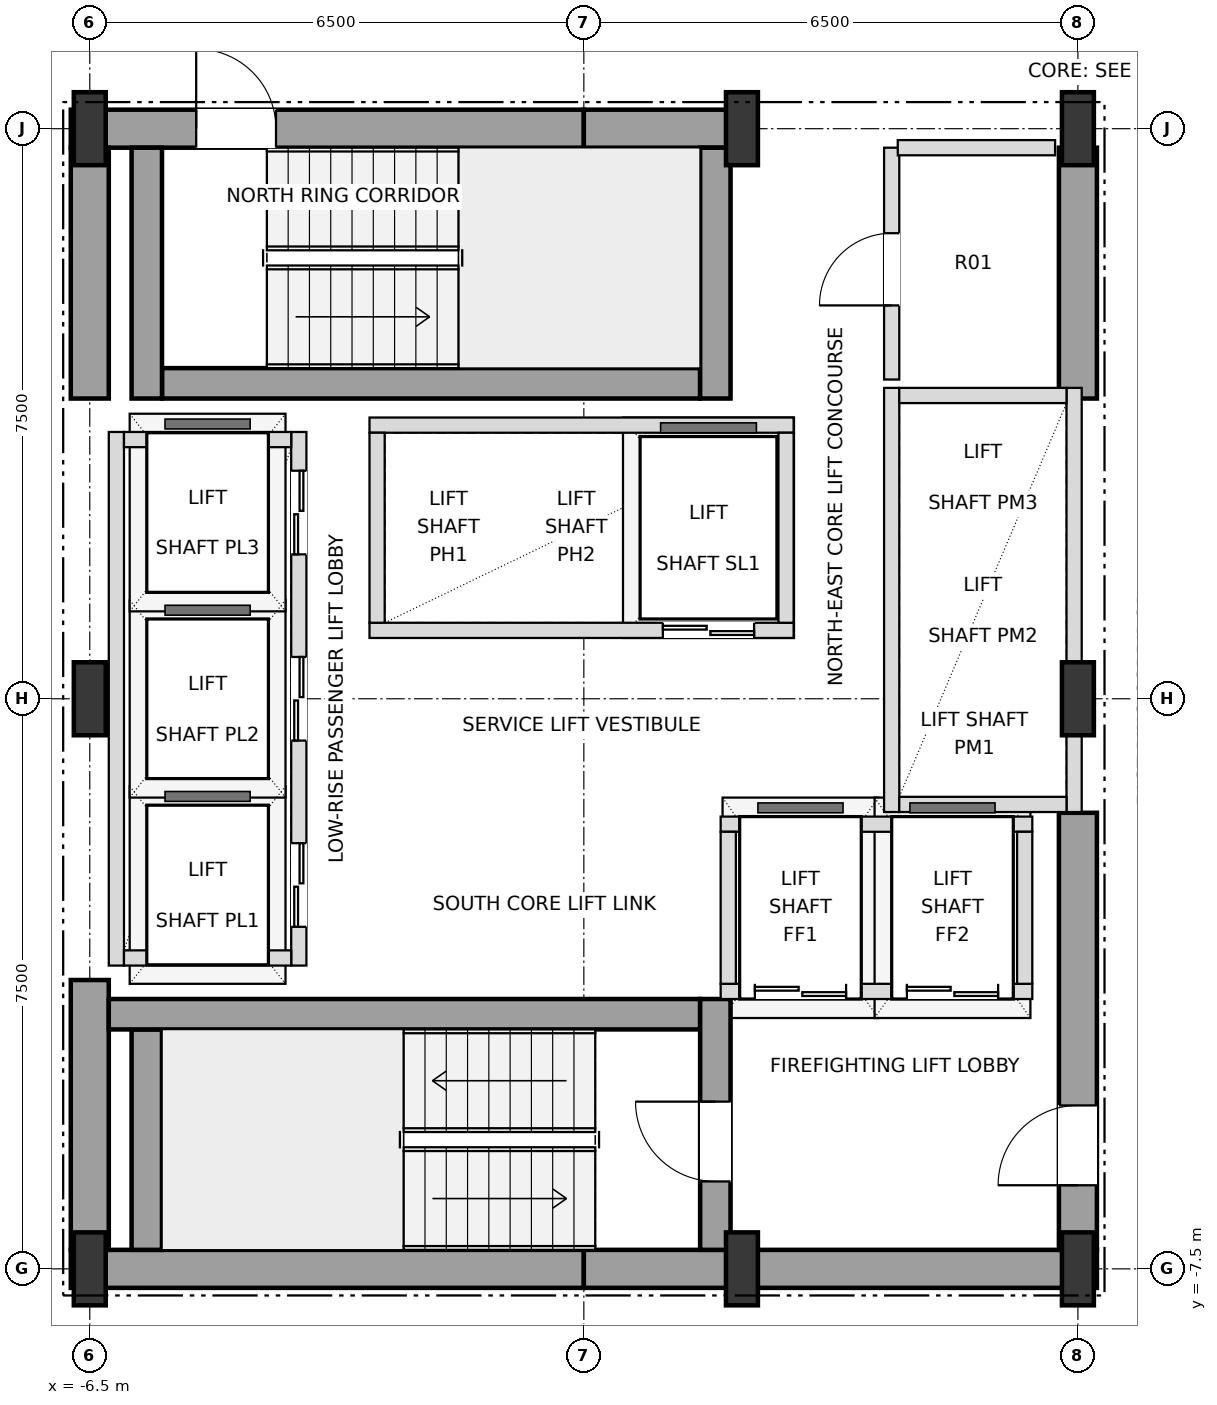
"""IFC4 building model, lengths in metres.
Left out: names, types, materials, properties, quantities, classifications, styles, units other than length and angle.
Written with IfcOpenShell. Run it as: python <this file> out.ifc"""

import sys

from ifc_helpers import new_model, si_unit, direction, frame, frame_2d, origin, origin_2d, place, context, subcontext, project, spatial, rectangle, i_section, extrude, element, fill, save


model = new_model("IFC4")
c1 = context("Model", 3, precision=1e-05, world=origin(), true_north=direction((0.0, 1.0)))
c2 = subcontext(c1, "Body", "Model", "MODEL_VIEW")
j1 = project(units=[si_unit("LENGTHUNIT", "METRE"), si_unit("PLANEANGLEUNIT", "RADIAN")], contexts=[c1])
p1 = place(None, origin())
s1 = spatial("IfcSite", under=j1, at=p1, CompositionType="ELEMENT")
p2 = place(p1, origin())
s2 = spatial("IfcBuilding", under=s1, at=p2, CompositionType="ELEMENT")
p3 = place(p2, frame((0.0, 0.0, 113.4)))
s3 = spatial("IfcBuildingStorey", under=s2, at=p3, CompositionType="ELEMENT", Elevation=113.4)
for number, where, z_axis, x_axis in (
    (1, (-6.5, -7.5, 0.0), (0.0, 0.0, 1.0), (1.0, 0.0, 0.0)),
    (2, (2.08, -7.5, 0.0), (0.0, 0.0, 1.0), (1.0, 0.0, 0.0)),
    (3, (6.5, -7.5, 0.0), (0.0, 0.0, 1.0), (1.0, 0.0, 0.0)),
    (4, (-6.5, 0.0, 0.0), (0.0, 0.0, 1.0), (1.0, 0.0, 0.0)),
    (5, (6.5, 0.0, 0.0), (0.0, 0.0, 1.0), (1.0, 0.0, 0.0)),
    (6, (-6.5, 7.5, 0.0), (0.0, 0.0, 1.0), (1.0, 0.0, 0.0)),
    (7, (2.08, 7.5, 0.0), (0.0, 0.0, 1.0), (1.0, 0.0, 0.0)),
    (8, (6.5, 7.5, 0.0), (0.0, 0.0, 1.0), (1.0, 0.0, 0.0)),
):
    element("IfcColumn", number, at=place(p3, frame(where, z_axis=z_axis, x_axis=x_axis)), inside=s3, PredefinedType="COLUMN", context=c2, shape_type="SweptSolid", body=[
        extrude(i_section(OverallWidth=0.42, OverallDepth=0.96, WebThickness=0.022, FlangeThickness=0.034, at=origin_2d()), origin(), (0.0, 0.0, 1.0), 3.6),
    ])
for number, where, z_axis, x_axis in (
    (9, (-6.75, -7.5, 0.0), (0.0, 0.0, 1.0), (1.0, 0.0, 0.0)),
    (10, (0.0, -7.5, 0.0), (0.0, 0.0, 1.0), (1.0, 0.0, 0.0)),
):
    element("IfcWall", number, at=place(p3, frame(where, z_axis=z_axis, x_axis=x_axis)), inside=s3, PredefinedType="SHEAR", context=c2, shape_type="SweptSolid", body=[
        extrude(rectangle(XDim=6.75, YDim=0.5, at=frame_2d((3.375, 0.0))), origin(), (0.0, 0.0, 1.0), 3.38),
    ])
p4 = place(p3, frame((-6.75, 7.5, 0.0), z_axis=(0.0, 0.0, 1.0), x_axis=(1.0, 0.0, 0.0)))
e11 = element("IfcWall", 11, at=p4, inside=s3, PredefinedType="SHEAR", context=c2, shape_type="SweptSolid", body=[
    extrude(rectangle(XDim=6.75, YDim=0.5, at=frame_2d((3.375, 0.0))), origin(), (0.0, 0.0, 1.0), 3.38),
])
p5 = place(p4, frame((1.65, 0.0, 0.0)))
e12 = element("IfcOpeningElement", 12, at=p5, cuts=e11, PredefinedType="OPENING", context=c2, shape_type="SweptSolid", body=[
    extrude(rectangle(XDim=1.05, YDim=2.15, at=frame_2d((0.525, 1.075))), frame((0.0, 0.26, 0.0), z_axis=(0.0, -1.0, 0.0), x_axis=(1.0, 0.0, 0.0)), (0.0, 0.0, 1.0), 0.52),
])
p6 = place(p3, frame((0.0, 7.5, 0.0), z_axis=(0.0, 0.0, 1.0), x_axis=(1.0, 0.0, 0.0)))
e13 = element("IfcWall", 13, at=p6, inside=s3, PredefinedType="SHEAR", context=c2, shape_type="SweptSolid", body=[
    extrude(rectangle(XDim=2.08, YDim=0.5, at=frame_2d((1.04, 0.0))), origin(), (0.0, 0.0, 1.0), 3.38),
])
p7 = place(p3, frame((-6.5, -7.25, 0.0), z_axis=(0.0, 0.0, 1.0), x_axis=(0.0, 1.0, 0.0)))
e14 = element("IfcWall", 14, at=p7, inside=s3, PredefinedType="SHEAR", context=c2, shape_type="SweptSolid", body=[
    extrude(rectangle(XDim=3.55, YDim=0.5, at=frame_2d((1.775, 0.0))), origin(), (0.0, 0.0, 1.0), 3.38),
])
p8 = place(p3, frame((-6.5, 3.95, 0.0), z_axis=(0.0, 0.0, 1.0), x_axis=(0.0, 1.0, 0.0)))
e15 = element("IfcWall", 15, at=p8, inside=s3, PredefinedType="SHEAR", context=c2, shape_type="SweptSolid", body=[
    extrude(rectangle(XDim=3.3, YDim=0.5, at=frame_2d((1.65, 0.0))), origin(), (0.0, 0.0, 1.0), 3.38),
])
p9 = place(p3, frame((6.5, -7.25, 0.0), z_axis=(0.0, 0.0, 1.0), x_axis=(0.0, 1.0, 0.0)))
e16 = element("IfcWall", 16, at=p9, inside=s3, PredefinedType="SHEAR", context=c2, shape_type="SweptSolid", body=[
    extrude(rectangle(XDim=5.75, YDim=0.5, at=frame_2d((2.875, 0.0))), origin(), (0.0, 0.0, 1.0), 3.38),
])
p10 = place(p9, frame((0.85, 0.0, 0.0)))
e17 = element("IfcOpeningElement", 17, at=p10, cuts=e16, PredefinedType="OPENING", context=c2, shape_type="SweptSolid", body=[
    extrude(rectangle(XDim=1.05, YDim=2.15, at=frame_2d((0.525, 1.075))), frame((0.0, 0.26, 0.0), z_axis=(0.0, -1.0, 0.0), x_axis=(1.0, 0.0, 0.0)), (0.0, 0.0, 1.0), 0.52),
])
p11 = place(p3, frame((6.5, 3.95, 0.0), z_axis=(0.0, 0.0, 1.0), x_axis=(0.0, 1.0, 0.0)))
e18 = element("IfcWall", 18, at=p11, inside=s3, PredefinedType="SHEAR", context=c2, shape_type="SweptSolid", body=[
    extrude(rectangle(XDim=3.3, YDim=0.5, at=frame_2d((1.65, 0.0))), origin(), (0.0, 0.0, 1.0), 3.38),
])
p12 = place(p3, frame((-5.75, -7.25, 0.0), z_axis=(0.0, 0.0, 1.0), x_axis=(0.0, 1.0, 0.0)))
e19 = element("IfcWall", 19, at=p12, inside=s3, PredefinedType="SHEAR", context=c2, shape_type="SweptSolid", body=[
    extrude(rectangle(XDim=2.9, YDim=0.4, at=frame_2d((1.45, 0.0))), origin(), (0.0, 0.0, 1.0), 3.38),
])
p13 = place(p3, frame((-6.25, -4.15, 0.0), z_axis=(0.0, 0.0, 1.0), x_axis=(1.0, 0.0, 0.0)))
e20 = element("IfcWall", 20, at=p13, inside=s3, PredefinedType="SHEAR", context=c2, shape_type="SweptSolid", body=[
    extrude(rectangle(XDim=7.78, YDim=0.4, at=frame_2d((3.89, 0.0))), origin(), (0.0, 0.0, 1.0), 3.38),
])
p14 = place(p3, frame((1.73, -7.25, 0.0), z_axis=(0.0, 0.0, 1.0), x_axis=(0.0, 1.0, 0.0)))
e21 = element("IfcWall", 21, at=p14, inside=s3, PredefinedType="SHEAR", context=c2, shape_type="SweptSolid", body=[
    extrude(rectangle(XDim=3.3, YDim=0.4, at=frame_2d((1.65, 0.0))), origin(), (0.0, 0.0, 1.0), 3.38),
])
p15 = place(p14, frame((0.9, 0.0, 0.0)))
e22 = element("IfcOpeningElement", 22, at=p15, cuts=e21, PredefinedType="OPENING", context=c2, shape_type="SweptSolid", body=[
    extrude(rectangle(XDim=1.05, YDim=2.15, at=frame_2d((0.525, 1.075))), frame((0.0, 0.21, 0.0), z_axis=(0.0, -1.0, 0.0), x_axis=(1.0, 0.0, 0.0)), (0.0, 0.0, 1.0), 0.42),
])
p16 = place(p3, frame((-5.55, 4.15, 0.0), z_axis=(0.0, 0.0, 1.0), x_axis=(1.0, 0.0, 0.0)))
e23 = element("IfcWall", 23, at=p16, inside=s3, PredefinedType="SHEAR", context=c2, shape_type="SweptSolid", body=[
    extrude(rectangle(XDim=7.08, YDim=0.4, at=frame_2d((3.54, 0.0))), origin(), (0.0, 0.0, 1.0), 3.38),
])
for number, where, z_axis, x_axis in (
    (24, (1.73, 3.95, 0.0), (0.0, 0.0, 1.0), (0.0, 1.0, 0.0)),
    (25, (-5.75, 3.95, 0.0), (0.0, 0.0, 1.0), (0.0, 1.0, 0.0)),
):
    element("IfcWall", number, at=place(p3, frame(where, z_axis=z_axis, x_axis=x_axis)), inside=s3, PredefinedType="SHEAR", context=c2, shape_type="SweptSolid", body=[
        extrude(rectangle(XDim=3.3, YDim=0.4, at=frame_2d((1.65, 0.0))), origin(), (0.0, 0.0, 1.0), 3.38),
    ])
p17 = place(p3, frame((-3.75, -3.51, 0.0), z_axis=(0.0, 0.0, 1.0), x_axis=(0.0, 1.0, 0.0)))
e26 = element("IfcWall", 26, at=p17, inside=s3, PredefinedType="SOLIDWALL", context=c2, shape_type="SweptSolid", body=[
    extrude(rectangle(XDim=7.02, YDim=0.2, at=frame_2d((3.51, 0.0))), origin(), (0.0, 0.0, 1.0), 3.38),
])
p18 = place(p17, frame((0.51, 0.0, 0.0)))
e27 = element("IfcOpeningElement", 27, at=p18, cuts=e26, PredefinedType="OPENING", context=c2, shape_type="SweptSolid", body=[
    extrude(rectangle(XDim=1.1, YDim=2.15, at=frame_2d((0.55, 1.075))), frame((0.0, 0.11, 0.0), z_axis=(0.0, -1.0, 0.0), x_axis=(1.0, 0.0, 0.0)), (0.0, 0.0, 1.0), 0.22),
])
p19 = place(p17, frame((2.96, 0.0, 0.0)))
e28 = element("IfcOpeningElement", 28, at=p19, cuts=e26, PredefinedType="OPENING", context=c2, shape_type="SweptSolid", body=[
    extrude(rectangle(XDim=1.1, YDim=2.15, at=frame_2d((0.55, 1.075))), frame((0.0, 0.11, 0.0), z_axis=(0.0, -1.0, 0.0), x_axis=(1.0, 0.0, 0.0)), (0.0, 0.0, 1.0), 0.22),
])
p20 = place(p17, frame((5.41, 0.0, 0.0)))
e29 = element("IfcOpeningElement", 29, at=p20, cuts=e26, PredefinedType="OPENING", context=c2, shape_type="SweptSolid", body=[
    extrude(rectangle(XDim=1.1, YDim=2.15, at=frame_2d((0.55, 1.075))), frame((0.0, 0.11, 0.0), z_axis=(0.0, -1.0, 0.0), x_axis=(1.0, 0.0, 0.0)), (0.0, 0.0, 1.0), 0.22),
])
p21 = place(p3, frame((-6.15, -3.51, 0.0), z_axis=(0.0, 0.0, 1.0), x_axis=(0.0, 1.0, 0.0)))
e30 = element("IfcWall", 30, at=p21, inside=s3, PredefinedType="SOLIDWALL", context=c2, shape_type="SweptSolid", body=[
    extrude(rectangle(XDim=7.02, YDim=0.2, at=frame_2d((3.51, 0.0))), origin(), (0.0, 0.0, 1.0), 3.38),
])
for number, where, z_axis, x_axis in (
    (31, (-6.05, -3.41, 0.0), (0.0, 0.0, 1.0), (1.0, 0.0, 0.0)),
    (32, (-6.05, 3.41, 0.0), (0.0, 0.0, 1.0), (1.0, 0.0, 0.0)),
):
    element("IfcWall", number, at=place(p3, frame(where, z_axis=z_axis, x_axis=x_axis)), inside=s3, PredefinedType="SOLIDWALL", context=c2, shape_type="SweptSolid", body=[
        extrude(rectangle(XDim=2.2, YDim=0.2, at=frame_2d((1.1, 0.0))), origin(), (0.0, 0.0, 1.0), 3.38),
    ])
p22 = place(p3, frame((4.05, -1.49, 0.0), z_axis=(0.0, 0.0, 1.0), x_axis=(0.0, 1.0, 0.0)))
e33 = element("IfcWall", 33, at=p22, inside=s3, PredefinedType="SOLIDWALL", context=c2, shape_type="SweptSolid", body=[
    extrude(rectangle(XDim=5.58, YDim=0.2, at=frame_2d((2.79, 0.0))), origin(), (0.0, 0.0, 1.0), 3.38),
])
p23 = place(p3, frame((6.45, -1.49, 0.0), z_axis=(0.0, 0.0, 1.0), x_axis=(0.0, 1.0, 0.0)))
e34 = element("IfcWall", 34, at=p23, inside=s3, PredefinedType="SOLIDWALL", context=c2, shape_type="SweptSolid", body=[
    extrude(rectangle(XDim=5.58, YDim=0.2, at=frame_2d((2.79, 0.0))), origin(), (0.0, 0.0, 1.0), 2.816),
])
for number, where, z_axis, x_axis in (
    (35, (4.15, -1.39, 0.0), (0.0, 0.0, 1.0), (1.0, 0.0, 0.0)),
    (36, (4.15, 3.99, 0.0), (0.0, 0.0, 1.0), (1.0, 0.0, 0.0)),
):
    element("IfcWall", number, at=place(p3, frame(where, z_axis=z_axis, x_axis=x_axis)), inside=s3, PredefinedType="SOLIDWALL", context=c2, shape_type="SweptSolid", body=[
        extrude(rectangle(XDim=2.2, YDim=0.2, at=frame_2d((1.1, 0.0))), origin(), (0.0, 0.0, 1.0), 3.38),
    ])
p24 = place(p3, frame((-2.82, 0.9, 0.0), z_axis=(0.0, 0.0, 1.0), x_axis=(1.0, 0.0, 0.0)))
e37 = element("IfcWall", 37, at=p24, inside=s3, PredefinedType="SOLIDWALL", context=c2, shape_type="SweptSolid", body=[
    extrude(rectangle(XDim=5.58, YDim=0.2, at=frame_2d((2.79, 0.0))), origin(), (0.0, 0.0, 1.0), 3.38),
])
p25 = place(p24, frame((3.86, 0.0, 0.0)))
e38 = element("IfcOpeningElement", 38, at=p25, cuts=e37, PredefinedType="OPENING", context=c2, shape_type="SweptSolid", body=[
    extrude(rectangle(XDim=1.2, YDim=2.2, at=frame_2d((0.6, 1.1))), frame((0.0, 0.11, 0.0), z_axis=(0.0, -1.0, 0.0), x_axis=(1.0, 0.0, 0.0)), (0.0, 0.0, 1.0), 0.22),
])
p26 = place(p3, frame((-2.82, 3.6, 0.0), z_axis=(0.0, 0.0, 1.0), x_axis=(1.0, 0.0, 0.0)))
e39 = element("IfcWall", 39, at=p26, inside=s3, PredefinedType="SOLIDWALL", context=c2, shape_type="SweptSolid", body=[
    extrude(rectangle(XDim=5.58, YDim=0.2, at=frame_2d((2.79, 0.0))), origin(), (0.0, 0.0, 1.0), 3.38),
])
for number, where, z_axis, x_axis in (
    (40, (-2.72, 1.0, 0.0), (0.0, 0.0, 1.0), (0.0, 1.0, 0.0)),
    (41, (2.66, 1.0, 0.0), (0.0, 0.0, 1.0), (0.0, 1.0, 0.0)),
):
    element("IfcWall", number, at=place(p3, frame(where, z_axis=z_axis, x_axis=x_axis)), inside=s3, PredefinedType="SOLIDWALL", context=c2, shape_type="SweptSolid", body=[
        extrude(rectangle(XDim=2.5, YDim=0.2, at=frame_2d((1.25, 0.0))), origin(), (0.0, 0.0, 1.0), 3.38),
    ])
p27 = place(p3, frame((1.8, -3.85, 0.0), z_axis=(0.0, 0.0, 1.0), x_axis=(1.0, 0.0, 0.0)))
e42 = element("IfcWall", 42, at=p27, inside=s3, PredefinedType="SOLIDWALL", context=c2, shape_type="SweptSolid", body=[
    extrude(rectangle(XDim=4.1, YDim=0.2, at=frame_2d((2.05, 0.0))), origin(), (0.0, 0.0, 1.0), 3.38),
])
p28 = place(p27, frame((0.45, 0.0, 0.0)))
e43 = element("IfcOpeningElement", 43, at=p28, cuts=e42, PredefinedType="OPENING", context=c2, shape_type="SweptSolid", body=[
    extrude(rectangle(XDim=1.2, YDim=2.2, at=frame_2d((0.6, 1.1))), frame((0.0, 0.11, 0.0), z_axis=(0.0, -1.0, 0.0), x_axis=(1.0, 0.0, 0.0)), (0.0, 0.0, 1.0), 0.22),
])
p29 = place(p27, frame((2.45, 0.0, 0.0)))
e44 = element("IfcOpeningElement", 44, at=p29, cuts=e42, PredefinedType="OPENING", context=c2, shape_type="SweptSolid", body=[
    extrude(rectangle(XDim=1.2, YDim=2.2, at=frame_2d((0.6, 1.1))), frame((0.0, 0.11, 0.0), z_axis=(0.0, -1.0, 0.0), x_axis=(1.0, 0.0, 0.0)), (0.0, 0.0, 1.0), 0.22),
])
p30 = place(p3, frame((1.8, -1.65, 0.0), z_axis=(0.0, 0.0, 1.0), x_axis=(1.0, 0.0, 0.0)))
e45 = element("IfcWall", 45, at=p30, inside=s3, PredefinedType="SOLIDWALL", context=c2, shape_type="SweptSolid", body=[
    extrude(rectangle(XDim=4.1, YDim=0.2, at=frame_2d((2.05, 0.0))), origin(), (0.0, 0.0, 1.0), 3.38),
])
for number, where, z_axis, x_axis in (
    (46, (1.9, -3.75, 0.0), (0.0, 0.0, 1.0), (0.0, 1.0, 0.0)),
    (47, (5.8, -3.75, 0.0), (0.0, 0.0, 1.0), (0.0, 1.0, 0.0)),
):
    element("IfcWall", number, at=place(p3, frame(where, z_axis=z_axis, x_axis=x_axis)), inside=s3, PredefinedType="SOLIDWALL", context=c2, shape_type="SweptSolid", body=[
        extrude(rectangle(XDim=2.0, YDim=0.2, at=frame_2d((1.0, 0.0))), origin(), (0.0, 0.0, 1.0), 3.38),
    ])
p31 = place(p3, frame((4.05, 4.2, 0.0), z_axis=(0.0, 0.0, 1.0), x_axis=(0.0, 1.0, 0.0)))
e48 = element("IfcWall", 48, at=p31, inside=s3, PredefinedType="SOLIDWALL", context=c2, shape_type="SweptSolid", body=[
    extrude(rectangle(XDim=3.05, YDim=0.2, at=frame_2d((1.525, 0.0))), origin(), (0.0, 0.0, 1.0), 3.38),
])
p32 = place(p31, frame((0.975, 0.0, 0.0)))
e49 = element("IfcOpeningElement", 49, at=p32, cuts=e48, PredefinedType="OPENING", context=c2, shape_type="SweptSolid", body=[
    extrude(rectangle(XDim=0.95, YDim=2.15, at=frame_2d((0.475, 1.075))), frame((0.0, 0.11, 0.0), z_axis=(0.0, -1.0, 0.0), x_axis=(1.0, 0.0, 0.0)), (0.0, 0.0, 1.0), 0.22),
])
p33 = place(p3, frame((4.13, 7.25, 0.0), z_axis=(0.0, 0.0, 1.0), x_axis=(1.0, 0.0, 0.0)))
e50 = element("IfcWall", 50, at=p33, inside=s3, PredefinedType="SOLIDWALL", context=c2, shape_type="SweptSolid", body=[
    extrude(rectangle(XDim=2.07, YDim=0.2, at=frame_2d((1.035, 0.0))), origin(), (0.0, 0.0, 1.0), 3.38),
])
p34 = place(p10, origin())
e51 = element("IfcDoor", 51, at=p34, inside=s3, OperationType="SINGLE_SWING_LEFT", PredefinedType="DOOR", context=c2, shape_type="SweptSolid", body=[
    extrude(rectangle(XDim=1.05, YDim=2.15, at=frame_2d((0.525, 1.075))), frame((0.0, 0.025, 0.0), z_axis=(0.0, -1.0, 0.0), x_axis=(1.0, 0.0, 0.0)), (0.0, 0.0, 1.0), 0.05),
])
fill(e17, e51)
p35 = place(p15, origin())
e52 = element("IfcDoor", 52, at=p35, inside=s3, OperationType="SINGLE_SWING_RIGHT", PredefinedType="DOOR", context=c2, shape_type="SweptSolid", body=[
    extrude(rectangle(XDim=1.05, YDim=2.15, at=frame_2d((0.525, 1.075))), frame((0.0, 0.025, 0.0), z_axis=(0.0, -1.0, 0.0), x_axis=(1.0, 0.0, 0.0)), (0.0, 0.0, 1.0), 0.05),
])
fill(e22, e52)
p36 = place(p5, origin())
e53 = element("IfcDoor", 53, at=p36, inside=s3, OperationType="SINGLE_SWING_LEFT", PredefinedType="DOOR", context=c2, shape_type="SweptSolid", body=[
    extrude(rectangle(XDim=1.05, YDim=2.15, at=frame_2d((0.525, 1.075))), frame((0.0, 0.025, 0.0), z_axis=(0.0, -1.0, 0.0), x_axis=(1.0, 0.0, 0.0)), (0.0, 0.0, 1.0), 0.05),
])
fill(e12, e53)
p37 = place(p18, origin())
e54 = element("IfcDoor", 54, at=p37, inside=s3, OperationType="DOUBLE_DOOR_SLIDING", PredefinedType="DOOR", context=c2, shape_type="SweptSolid", body=[
    extrude(rectangle(XDim=1.1, YDim=2.15, at=frame_2d((0.55, 1.075))), frame((0.0, 0.025, 0.0), z_axis=(0.0, -1.0, 0.0), x_axis=(1.0, 0.0, 0.0)), (0.0, 0.0, 1.0), 0.05),
])
fill(e27, e54)
p38 = place(p19, origin())
e55 = element("IfcDoor", 55, at=p38, inside=s3, OperationType="DOUBLE_DOOR_SLIDING", PredefinedType="DOOR", context=c2, shape_type="SweptSolid", body=[
    extrude(rectangle(XDim=1.1, YDim=2.15, at=frame_2d((0.55, 1.075))), frame((0.0, 0.025, 0.0), z_axis=(0.0, -1.0, 0.0), x_axis=(1.0, 0.0, 0.0)), (0.0, 0.0, 1.0), 0.05),
])
fill(e28, e55)
p39 = place(p20, origin())
e56 = element("IfcDoor", 56, at=p39, inside=s3, OperationType="DOUBLE_DOOR_SLIDING", PredefinedType="DOOR", context=c2, shape_type="SweptSolid", body=[
    extrude(rectangle(XDim=1.1, YDim=2.15, at=frame_2d((0.55, 1.075))), frame((0.0, 0.025, 0.0), z_axis=(0.0, -1.0, 0.0), x_axis=(1.0, 0.0, 0.0)), (0.0, 0.0, 1.0), 0.05),
])
fill(e29, e56)
p40 = place(p25, origin())
e57 = element("IfcDoor", 57, at=p40, inside=s3, OperationType="DOUBLE_DOOR_SLIDING", PredefinedType="DOOR", context=c2, shape_type="SweptSolid", body=[
    extrude(rectangle(XDim=1.2, YDim=2.2, at=frame_2d((0.6, 1.1))), frame((0.0, 0.025, 0.0), z_axis=(0.0, -1.0, 0.0), x_axis=(1.0, 0.0, 0.0)), (0.0, 0.0, 1.0), 0.05),
])
fill(e38, e57)
p41 = place(p28, origin())
e58 = element("IfcDoor", 58, at=p41, inside=s3, OperationType="DOUBLE_DOOR_SLIDING", PredefinedType="DOOR", context=c2, shape_type="SweptSolid", body=[
    extrude(rectangle(XDim=1.2, YDim=2.2, at=frame_2d((0.6, 1.1))), frame((0.0, 0.025, 0.0), z_axis=(0.0, -1.0, 0.0), x_axis=(1.0, 0.0, 0.0)), (0.0, 0.0, 1.0), 0.05),
])
fill(e43, e58)
p42 = place(p29, origin())
e59 = element("IfcDoor", 59, at=p42, inside=s3, OperationType="DOUBLE_DOOR_SLIDING", PredefinedType="DOOR", context=c2, shape_type="SweptSolid", body=[
    extrude(rectangle(XDim=1.2, YDim=2.2, at=frame_2d((0.6, 1.1))), frame((0.0, 0.025, 0.0), z_axis=(0.0, -1.0, 0.0), x_axis=(1.0, 0.0, 0.0)), (0.0, 0.0, 1.0), 0.05),
])
fill(e44, e59)
p43 = place(p32, origin())
e60 = element("IfcDoor", 60, at=p43, inside=s3, OperationType="SINGLE_SWING_LEFT", PredefinedType="DOOR", context=c2, shape_type="SweptSolid", body=[
    extrude(rectangle(XDim=0.95, YDim=2.15, at=frame_2d((0.475, 1.075))), frame((0.0, 0.025, 0.0), z_axis=(0.0, -1.0, 0.0), x_axis=(1.0, 0.0, 0.0)), (0.0, 0.0, 1.0), 0.05),
])
fill(e49, e60)
save(model, sys.argv[1])
